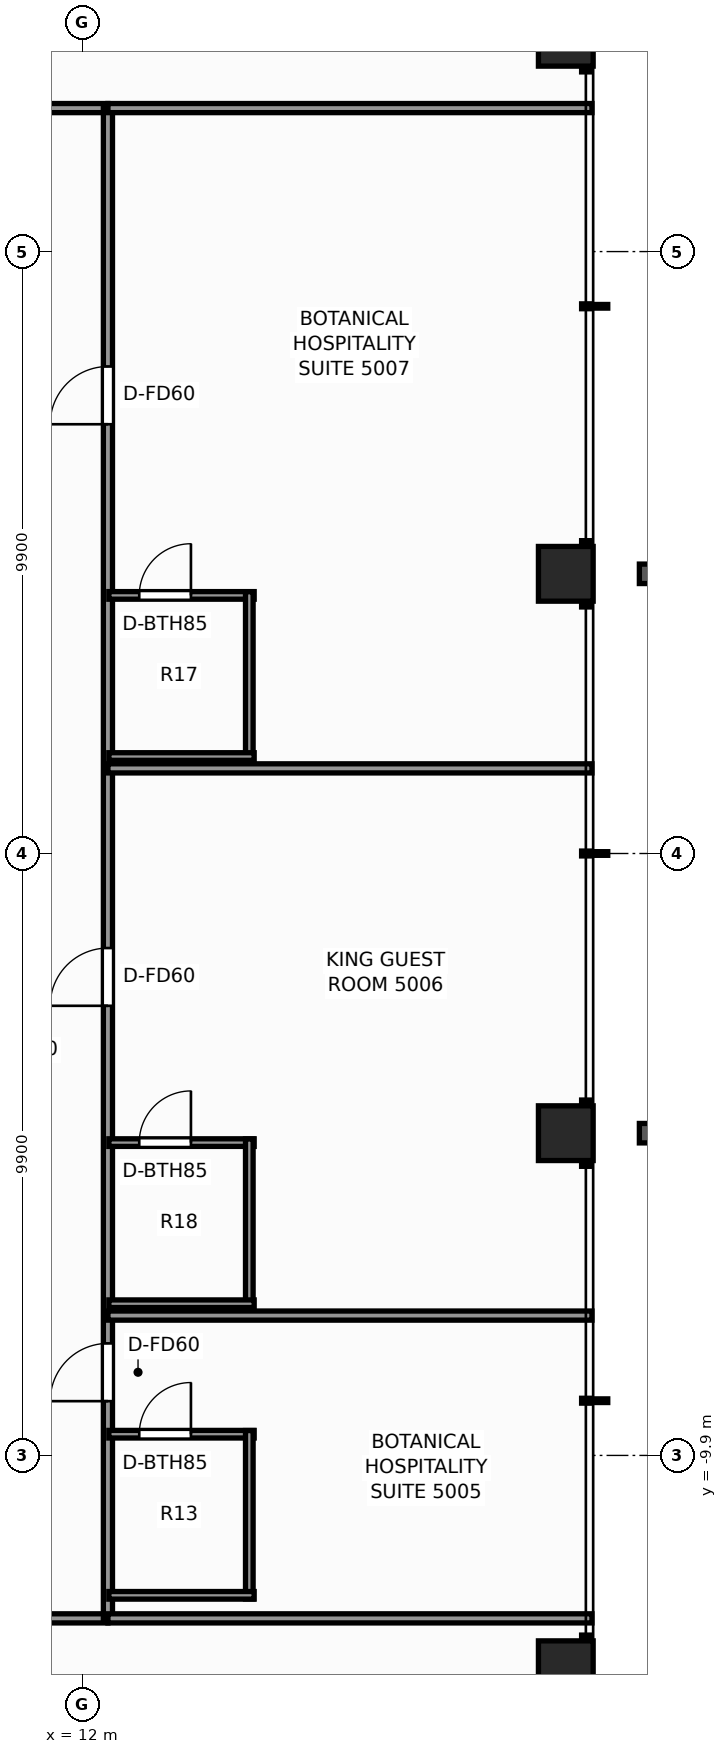
"""IFC4 building model, lengths in metres.
Left out: names, types, materials, properties, quantities, classifications, styles, units other than length and angle.
Written with IfcOpenShell. Run it as: python <this file> out.ifc"""

import sys

from ifc_helpers import new_model, si_unit, direction, frame, frame_2d, origin, origin_2d, place, context, subcontext, project, spatial, rectangle, extrude, element, fill, save


model = new_model("IFC4")
c1 = context("Model", 3, precision=1e-05, world=origin(), true_north=direction((0.0, 1.0)))
c2 = subcontext(c1, "Body", "Model", "MODEL_VIEW")
j1 = project(units=[si_unit("LENGTHUNIT", "METRE"), si_unit("PLANEANGLEUNIT", "RADIAN")], contexts=[c1])
p1 = place(None, origin())
s1 = spatial("IfcSite", under=j1, at=p1, CompositionType="ELEMENT")
p2 = place(p1, origin())
s2 = spatial("IfcBuilding", under=s1, at=p2, CompositionType="ELEMENT")
p3 = place(p2, frame((0.0, 0.0, 173.4)))
s3 = spatial("IfcBuildingStorey", under=s2, at=p3, CompositionType="ELEMENT", Elevation=173.4)
for number, where, z_axis, x_axis in (
    (1, (19.95, -13.4, 0.0), (0.0, 0.0, 1.0), (1.0, 0.0, 0.0)),
    (2, (19.95, -4.6, 0.0), (0.0, 0.0, 1.0), (1.0, 0.0, 0.0)),
    (3, (19.95, 4.6, 0.0), (0.0, 0.0, 1.0), (1.0, 0.0, 0.0)),
    (4, (19.95, 13.4, 0.0), (0.0, 0.0, 1.0), (1.0, 0.0, 0.0)),
):
    element("IfcColumn", number, at=place(p3, frame(where, z_axis=z_axis, x_axis=x_axis)), inside=s3, PredefinedType="COLUMN", context=c2, shape_type="SweptSolid", body=[
        extrude(rectangle(XDim=0.9, YDim=0.9, at=origin_2d()), origin(), (0.0, 0.0, 1.0), 3.3),
    ])
p4 = place(p3, frame((-12.58, -12.58, 0.0), z_axis=(0.0, 0.0, 1.0), x_axis=(1.0, 0.0, 0.0)))
e5 = element("IfcWall", 5, at=p4, inside=s3, PredefinedType="PARTITIONING", context=c2, shape_type="SweptSolid", body=[
    extrude(rectangle(XDim=25.0, YDim=0.15, at=frame_2d((12.5, 0.0))), origin(), (0.0, 0.0, 1.0), 2.369),
])
p5 = place(p4, frame((3.639, 0.0, 0.0)))
e6 = element("IfcOpeningElement", 6, at=p5, cuts=e5, PredefinedType="OPENING", context=c2, shape_type="SweptSolid", body=[
    extrude(rectangle(XDim=0.9, YDim=2.06, at=frame_2d((0.45, 1.03))), frame((0.0, 0.085, 0.0), z_axis=(0.0, -1.0, 0.0), x_axis=(1.0, 0.0, 0.0)), (0.0, 0.0, 1.0), 0.17),
])
p6 = place(p4, frame((5.974, 0.0, 0.0)))
e7 = element("IfcOpeningElement", 7, at=p6, cuts=e5, PredefinedType="OPENING", context=c2, shape_type="SweptSolid", body=[
    extrude(rectangle(XDim=0.9, YDim=2.06, at=frame_2d((0.45, 1.03))), frame((0.0, 0.085, 0.0), z_axis=(0.0, -1.0, 0.0), x_axis=(1.0, 0.0, 0.0)), (0.0, 0.0, 1.0), 0.17),
])
p7 = place(p4, frame((10.708, 0.0, 0.0)))
e8 = element("IfcOpeningElement", 8, at=p7, cuts=e5, PredefinedType="OPENING", context=c2, shape_type="SweptSolid", body=[
    extrude(rectangle(XDim=0.9, YDim=2.06, at=frame_2d((0.45, 1.03))), frame((0.0, 0.085, 0.0), z_axis=(0.0, -1.0, 0.0), x_axis=(1.0, 0.0, 0.0)), (0.0, 0.0, 1.0), 0.17),
])
p8 = place(p4, frame((13.698, 0.0, 0.0)))
e9 = element("IfcOpeningElement", 9, at=p8, cuts=e5, PredefinedType="OPENING", context=c2, shape_type="SweptSolid", body=[
    extrude(rectangle(XDim=0.95, YDim=2.06, at=frame_2d((0.475, 1.03))), frame((0.0, 0.085, 0.0), z_axis=(0.0, -1.0, 0.0), x_axis=(1.0, 0.0, 0.0)), (0.0, 0.0, 1.0), 0.17),
])
p9 = place(p4, frame((18.206, 0.0, 0.0)))
e10 = element("IfcOpeningElement", 10, at=p9, cuts=e5, PredefinedType="OPENING", context=c2, shape_type="SweptSolid", body=[
    extrude(rectangle(XDim=0.9, YDim=2.06, at=frame_2d((0.45, 1.03))), frame((0.0, 0.085, 0.0), z_axis=(0.0, -1.0, 0.0), x_axis=(1.0, 0.0, 0.0)), (0.0, 0.0, 1.0), 0.17),
])
p10 = place(p4, frame((20.541, 0.0, 0.0)))
e11 = element("IfcOpeningElement", 11, at=p10, cuts=e5, PredefinedType="OPENING", context=c2, shape_type="SweptSolid", body=[
    extrude(rectangle(XDim=0.9, YDim=2.06, at=frame_2d((0.45, 1.03))), frame((0.0, 0.085, 0.0), z_axis=(0.0, -1.0, 0.0), x_axis=(1.0, 0.0, 0.0)), (0.0, 0.0, 1.0), 0.17),
])
p11 = place(p3, frame((-12.58, 12.26, 0.0), z_axis=(0.0, 0.0, 1.0), x_axis=(1.0, 0.0, 0.0)))
e12 = element("IfcWall", 12, at=p11, inside=s3, PredefinedType="PARTITIONING", context=c2, shape_type="SweptSolid", body=[
    extrude(rectangle(XDim=25.0, YDim=0.15, at=frame_2d((12.5, 0.0))), origin(), (0.0, 0.0, 1.0), 2.369),
])
p12 = place(p11, frame((4.595, 0.0, 0.0)))
e13 = element("IfcOpeningElement", 13, at=p12, cuts=e12, PredefinedType="OPENING", context=c2, shape_type="SweptSolid", body=[
    extrude(rectangle(XDim=0.9, YDim=2.06, at=frame_2d((0.45, 1.03))), frame((0.0, 0.085, 0.0), z_axis=(0.0, -1.0, 0.0), x_axis=(1.0, 0.0, 0.0)), (0.0, 0.0, 1.0), 0.17),
])
p13 = place(p11, frame((19.665, 0.0, 0.0)))
e14 = element("IfcOpeningElement", 14, at=p13, cuts=e12, PredefinedType="OPENING", context=c2, shape_type="SweptSolid", body=[
    extrude(rectangle(XDim=0.9, YDim=2.06, at=frame_2d((0.45, 1.03))), frame((0.0, 0.085, 0.0), z_axis=(0.0, -1.0, 0.0), x_axis=(1.0, 0.0, 0.0)), (0.0, 0.0, 1.0), 0.17),
])
p14 = place(p3, frame((12.42, -12.58, 0.0), z_axis=(0.0, 0.0, 1.0), x_axis=(0.0, 1.0, 0.0)))
e15 = element("IfcWall", 15, at=p14, inside=s3, PredefinedType="PARTITIONING", context=c2, shape_type="SweptSolid", body=[
    extrude(rectangle(XDim=24.84, YDim=0.15, at=frame_2d((12.42, 0.0))), origin(), (0.0, 0.0, 1.0), 2.369),
])
p15 = place(p14, frame((3.573, 0.0, 0.0)))
e16 = element("IfcOpeningElement", 16, at=p15, cuts=e15, PredefinedType="OPENING", context=c2, shape_type="SweptSolid", body=[
    extrude(rectangle(XDim=0.95, YDim=2.06, at=frame_2d((0.475, 1.03))), frame((0.0, 0.085, 0.0), z_axis=(0.0, -1.0, 0.0), x_axis=(1.0, 0.0, 0.0)), (0.0, 0.0, 1.0), 0.17),
])
p16 = place(p14, frame((10.075, 0.0, 0.0)))
e17 = element("IfcOpeningElement", 17, at=p16, cuts=e15, PredefinedType="OPENING", context=c2, shape_type="SweptSolid", body=[
    extrude(rectangle(XDim=0.95, YDim=2.06, at=frame_2d((0.475, 1.03))), frame((0.0, 0.085, 0.0), z_axis=(0.0, -1.0, 0.0), x_axis=(1.0, 0.0, 0.0)), (0.0, 0.0, 1.0), 0.17),
])
p17 = place(p14, frame((19.64, 0.0, 0.0)))
e18 = element("IfcOpeningElement", 18, at=p17, cuts=e15, PredefinedType="OPENING", context=c2, shape_type="SweptSolid", body=[
    extrude(rectangle(XDim=0.95, YDim=2.06, at=frame_2d((0.475, 1.03))), frame((0.0, 0.085, 0.0), z_axis=(0.0, -1.0, 0.0), x_axis=(1.0, 0.0, 0.0)), (0.0, 0.0, 1.0), 0.17),
])
for number, where, z_axis, x_axis in (
    (19, (12.42, -12.58, 0.0), (0.0, 0.0, 1.0), (1.0, 0.0, 0.0)),
    (20, (12.42, 12.26, 0.0), (0.0, 0.0, 1.0), (1.0, 0.0, 0.0)),
):
    element("IfcWall", number, at=place(p3, frame(where, z_axis=z_axis, x_axis=x_axis)), inside=s3, PredefinedType="PARTITIONING", context=c2, shape_type="SweptSolid", body=[
        extrude(rectangle(XDim=7.96, YDim=0.15, at=frame_2d((3.98, 0.0))), origin(), (0.0, 0.0, 1.0), 2.369),
    ])
p18 = place(p3, frame((12.42, -7.6, 0.0), z_axis=(0.0, 0.0, 1.0), x_axis=(1.0, 0.0, 0.0)))
e21 = element("IfcWall", 21, at=p18, inside=s3, PredefinedType="PARTITIONING", context=c2, shape_type="SweptSolid", body=[
    extrude(rectangle(XDim=7.96, YDim=0.15, at=frame_2d((3.98, 0.0))), origin(), (0.0, 0.0, 1.0), 2.453),
])
p19 = place(p3, frame((12.435, -9.551, 0.0), z_axis=(0.0, 0.0, 1.0), x_axis=(1.0, 0.0, 0.0)))
e22 = element("IfcWall", 22, at=p19, inside=s3, PredefinedType="PARTITIONING", context=c2, shape_type="SweptSolid", body=[
    extrude(rectangle(XDim=2.39, YDim=0.125, at=frame_2d((1.195, 0.0))), origin(), (0.0, 0.0, 1.0), 3.08),
])
p20 = place(p19, frame((0.5, 0.0, 0.0)))
e23 = element("IfcOpeningElement", 23, at=p20, cuts=e22, PredefinedType="OPENING", context=c2, shape_type="SweptSolid", body=[
    extrude(rectangle(XDim=0.85, YDim=2.03, at=frame_2d((0.425, 1.015))), frame((0.0, 0.073, 0.0), z_axis=(0.0, -1.0, 0.0), x_axis=(1.0, 0.0, 0.0)), (0.0, 0.0, 1.0), 0.145),
])
p21 = place(p3, frame((14.745, -12.261, 0.0), z_axis=(0.0, 0.0, 1.0), x_axis=(0.0, 1.0, 0.0)))
e24 = element("IfcWall", 24, at=p21, inside=s3, PredefinedType="PARTITIONING", context=c2, shape_type="SweptSolid", body=[
    extrude(rectangle(XDim=2.77, YDim=0.125, at=frame_2d((1.385, 0.0))), origin(), (0.0, 0.0, 1.0), 2.369),
])
p22 = place(p3, frame((12.435, -12.201, 0.0), z_axis=(0.0, 0.0, 1.0), x_axis=(1.0, 0.0, 0.0)))
e25 = element("IfcWall", 25, at=p22, inside=s3, PredefinedType="PARTITIONING", context=c2, shape_type="SweptSolid", body=[
    extrude(rectangle(XDim=2.39, YDim=0.125, at=frame_2d((1.195, 0.0))), origin(), (0.0, 0.0, 1.0), 3.08),
])
p23 = place(p3, frame((12.42, 1.4, 0.0), z_axis=(0.0, 0.0, 1.0), x_axis=(1.0, 0.0, 0.0)))
e26 = element("IfcWall", 26, at=p23, inside=s3, PredefinedType="PARTITIONING", context=c2, shape_type="SweptSolid", body=[
    extrude(rectangle(XDim=7.96, YDim=0.15, at=frame_2d((3.98, 0.0))), origin(), (0.0, 0.0, 1.0), 2.453),
])
p24 = place(p3, frame((12.435, -4.755, 0.0), z_axis=(0.0, 0.0, 1.0), x_axis=(1.0, 0.0, 0.0)))
e27 = element("IfcWall", 27, at=p24, inside=s3, PredefinedType="PARTITIONING", context=c2, shape_type="SweptSolid", body=[
    extrude(rectangle(XDim=2.39, YDim=0.125, at=frame_2d((1.195, 0.0))), origin(), (0.0, 0.0, 1.0), 2.369),
])
p25 = place(p24, frame((0.5, 0.0, 0.0)))
e28 = element("IfcOpeningElement", 28, at=p25, cuts=e27, PredefinedType="OPENING", context=c2, shape_type="SweptSolid", body=[
    extrude(rectangle(XDim=0.85, YDim=2.03, at=frame_2d((0.425, 1.015))), frame((0.0, 0.073, 0.0), z_axis=(0.0, -1.0, 0.0), x_axis=(1.0, 0.0, 0.0)), (0.0, 0.0, 1.0), 0.145),
])
p26 = place(p3, frame((14.745, -7.465, 0.0), z_axis=(0.0, 0.0, 1.0), x_axis=(0.0, 1.0, 0.0)))
e29 = element("IfcWall", 29, at=p26, inside=s3, PredefinedType="PARTITIONING", context=c2, shape_type="SweptSolid", body=[
    extrude(rectangle(XDim=2.77, YDim=0.125, at=frame_2d((1.385, 0.0))), origin(), (0.0, 0.0, 1.0), 2.369),
])
p27 = place(p3, frame((12.435, -7.405, 0.0), z_axis=(0.0, 0.0, 1.0), x_axis=(1.0, 0.0, 0.0)))
e30 = element("IfcWall", 30, at=p27, inside=s3, PredefinedType="PARTITIONING", context=c2, shape_type="SweptSolid", body=[
    extrude(rectangle(XDim=2.39, YDim=0.125, at=frame_2d((1.195, 0.0))), origin(), (0.0, 0.0, 1.0), 3.08),
])
p28 = place(p3, frame((12.435, 4.245, 0.0), z_axis=(0.0, 0.0, 1.0), x_axis=(1.0, 0.0, 0.0)))
e31 = element("IfcWall", 31, at=p28, inside=s3, PredefinedType="PARTITIONING", context=c2, shape_type="SweptSolid", body=[
    extrude(rectangle(XDim=2.39, YDim=0.125, at=frame_2d((1.195, 0.0))), origin(), (0.0, 0.0, 1.0), 3.08),
])
p29 = place(p28, frame((0.5, 0.0, 0.0)))
e32 = element("IfcOpeningElement", 32, at=p29, cuts=e31, PredefinedType="OPENING", context=c2, shape_type="SweptSolid", body=[
    extrude(rectangle(XDim=0.85, YDim=2.03, at=frame_2d((0.425, 1.015))), frame((0.0, 0.073, 0.0), z_axis=(0.0, -1.0, 0.0), x_axis=(1.0, 0.0, 0.0)), (0.0, 0.0, 1.0), 0.145),
])
p30 = place(p3, frame((14.745, 1.535, 0.0), z_axis=(0.0, 0.0, 1.0), x_axis=(0.0, 1.0, 0.0)))
e33 = element("IfcWall", 33, at=p30, inside=s3, PredefinedType="PARTITIONING", context=c2, shape_type="SweptSolid", body=[
    extrude(rectangle(XDim=2.77, YDim=0.125, at=frame_2d((1.385, 0.0))), origin(), (0.0, 0.0, 1.0), 2.369),
])
p31 = place(p3, frame((12.435, 1.595, 0.0), z_axis=(0.0, 0.0, 1.0), x_axis=(1.0, 0.0, 0.0)))
e34 = element("IfcWall", 34, at=p31, inside=s3, PredefinedType="PARTITIONING", context=c2, shape_type="SweptSolid", body=[
    extrude(rectangle(XDim=2.39, YDim=0.125, at=frame_2d((1.195, 0.0))), origin(), (0.0, 0.0, 1.0), 3.08),
])
p32 = place(p20, origin())
e35 = element("IfcDoor", 35, at=p32, inside=s3, OperationType="SINGLE_SWING_RIGHT", PredefinedType="DOOR", context=c2, shape_type="SweptSolid", body=[
    extrude(rectangle(XDim=0.85, YDim=2.03, at=frame_2d((0.425, 1.015))), frame((0.0, 0.025, 0.0), z_axis=(0.0, -1.0, 0.0), x_axis=(1.0, 0.0, 0.0)), (0.0, 0.0, 1.0), 0.05),
])
fill(e23, e35)
p33 = place(p15, origin())
e36 = element("IfcDoor", 36, at=p33, inside=s3, OperationType="SINGLE_SWING_LEFT", PredefinedType="DOOR", context=c2, shape_type="SweptSolid", body=[
    extrude(rectangle(XDim=0.95, YDim=2.06, at=frame_2d((0.475, 1.03))), frame((0.0, 0.025, 0.0), z_axis=(0.0, -1.0, 0.0), x_axis=(1.0, 0.0, 0.0)), (0.0, 0.0, 1.0), 0.05),
])
fill(e16, e36)
p34 = place(p25, origin())
e37 = element("IfcDoor", 37, at=p34, inside=s3, OperationType="SINGLE_SWING_RIGHT", PredefinedType="DOOR", context=c2, shape_type="SweptSolid", body=[
    extrude(rectangle(XDim=0.85, YDim=2.03, at=frame_2d((0.425, 1.015))), frame((0.0, 0.025, 0.0), z_axis=(0.0, -1.0, 0.0), x_axis=(1.0, 0.0, 0.0)), (0.0, 0.0, 1.0), 0.05),
])
fill(e28, e37)
p35 = place(p16, origin())
e38 = element("IfcDoor", 38, at=p35, inside=s3, OperationType="SINGLE_SWING_LEFT", PredefinedType="DOOR", context=c2, shape_type="SweptSolid", body=[
    extrude(rectangle(XDim=0.95, YDim=2.06, at=frame_2d((0.475, 1.03))), frame((0.0, 0.025, 0.0), z_axis=(0.0, -1.0, 0.0), x_axis=(1.0, 0.0, 0.0)), (0.0, 0.0, 1.0), 0.05),
])
fill(e17, e38)
p36 = place(p29, origin())
e39 = element("IfcDoor", 39, at=p36, inside=s3, OperationType="SINGLE_SWING_RIGHT", PredefinedType="DOOR", context=c2, shape_type="SweptSolid", body=[
    extrude(rectangle(XDim=0.85, YDim=2.03, at=frame_2d((0.425, 1.015))), frame((0.0, 0.025, 0.0), z_axis=(0.0, -1.0, 0.0), x_axis=(1.0, 0.0, 0.0)), (0.0, 0.0, 1.0), 0.05),
])
fill(e32, e39)
p37 = place(p17, origin())
e40 = element("IfcDoor", 40, at=p37, inside=s3, OperationType="SINGLE_SWING_LEFT", PredefinedType="DOOR", context=c2, shape_type="SweptSolid", body=[
    extrude(rectangle(XDim=0.95, YDim=2.06, at=frame_2d((0.475, 1.03))), frame((0.0, 0.025, 0.0), z_axis=(0.0, -1.0, 0.0), x_axis=(1.0, 0.0, 0.0)), (0.0, 0.0, 1.0), 0.05),
])
fill(e18, e40)
save(model, sys.argv[1])
